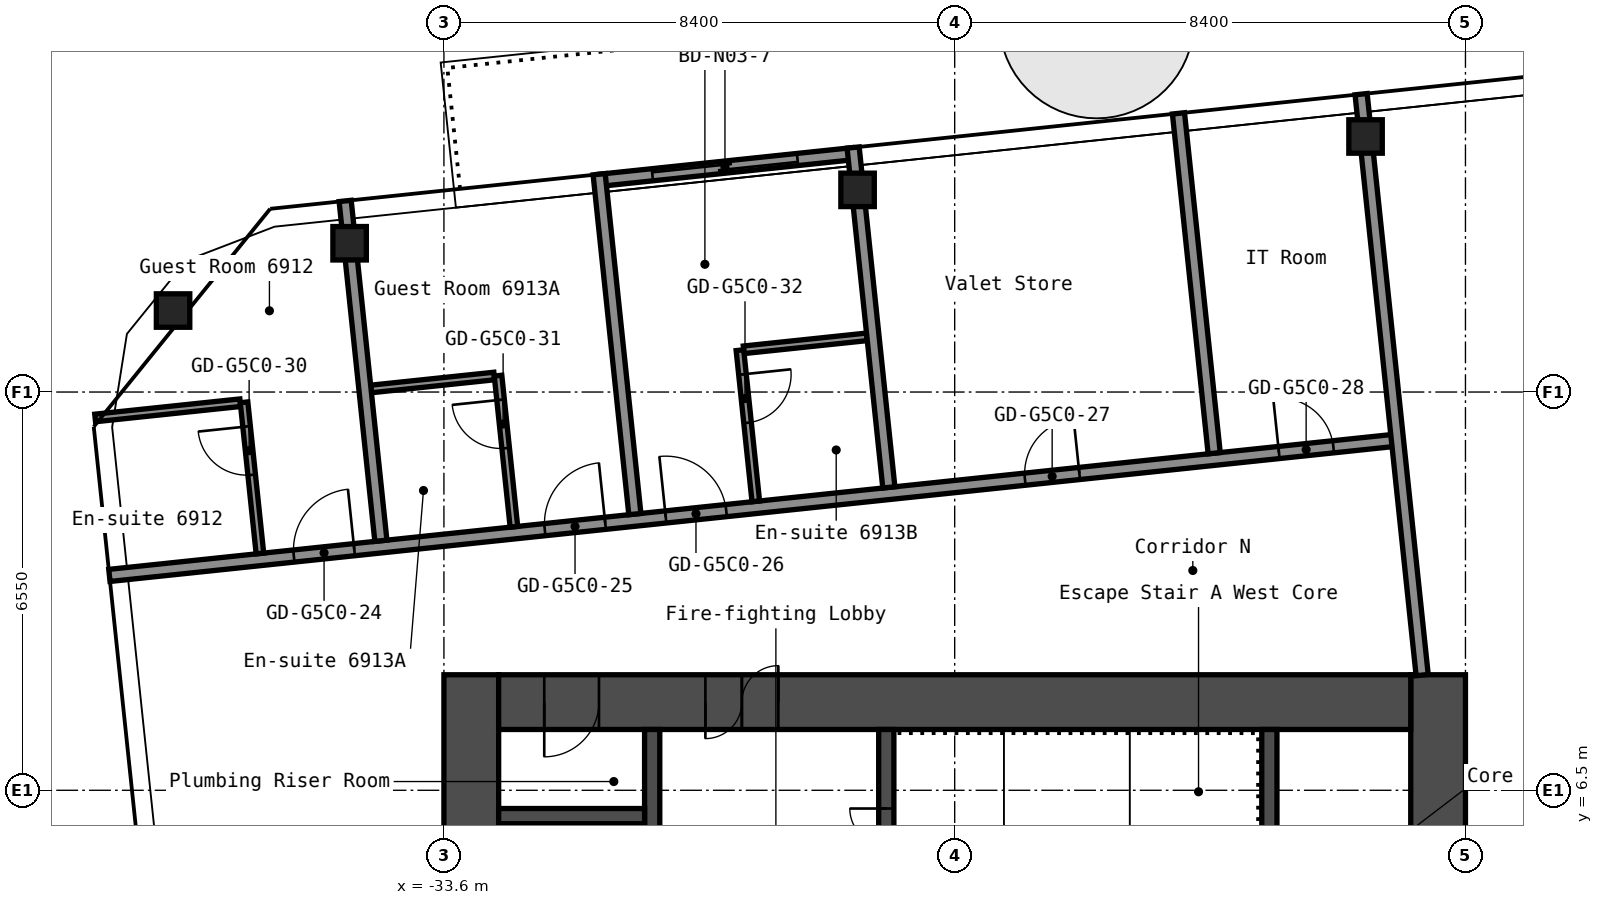
"""IFC4 building model, lengths in metres.
Left out: names, types, materials, properties, quantities, classifications, styles, units other than length and angle.
Written with IfcOpenShell. Run it as: python <this file> out.ifc"""

import sys

from ifc_helpers import new_model, si_unit, direction, frame, frame_2d, origin, origin_2d, place, context, subcontext, project, spatial, rectangle, hollow_rectangle, extrude, element, fill, save


model = new_model("IFC4")
c1 = context("Model", 3, precision=1e-05, world=origin(), true_north=direction((0.0, 1.0)))
c2 = subcontext(c1, "Body", "Model", "MODEL_VIEW")
j1 = project(units=[si_unit("LENGTHUNIT", "METRE"), si_unit("PLANEANGLEUNIT", "RADIAN")], contexts=[c1])
p1 = place(None, origin())
s1 = spatial("IfcSite", under=j1, at=p1, CompositionType="ELEMENT")
p2 = place(p1, origin())
s2 = spatial("IfcBuilding", under=s1, at=p2, CompositionType="ELEMENT")
p3 = place(p2, frame((0.0, 0.0, 245.4)))
s3 = spatial("IfcBuildingStorey", under=s2, at=p3, CompositionType="ELEMENT", Elevation=245.4)
for number, where, z_axis, x_axis in (
    (1, (-38.054, 14.39, 0.0), (0.0, 0.0, 1.0), (1.0, 0.0, 0.0)),
    (2, (-35.151, 15.497, 0.0), (0.0, 0.0, 1.0), (1.0, 0.0, 0.0)),
    (3, (-26.797, 16.375, 0.0), (0.0, 0.0, 1.0), (1.0, 0.0, 0.0)),
    (4, (-18.443, 17.253, 0.0), (0.0, 0.0, 1.0), (1.0, 0.0, 0.0)),
):
    element("IfcColumn", number, at=place(p3, frame(where, z_axis=z_axis, x_axis=x_axis)), inside=s3, PredefinedType="COLUMN", context=c2, shape_type="SweptSolid", body=[
        extrude(hollow_rectangle(XDim=0.55, YDim=0.55, WallThickness=0.022, InnerFilletRadius=0.033, OuterFilletRadius=0.055, at=origin_2d()), origin(), (0.0, 0.0, 1.0), 2.75),
    ])
p4 = place(p3, frame((-17.25, -8.4, 0.0), z_axis=(0.0, 0.0, 1.0), x_axis=(0.0, 1.0, 0.0)))
e5 = element("IfcWall", 5, at=p4, inside=s3, PredefinedType="SHEAR", context=c2, shape_type="SweptSolid", body=[
    extrude(rectangle(XDim=16.8, YDim=0.9, at=frame_2d((8.4, 0.0))), origin(), (0.0, 0.0, 1.0), 2.75),
])
p5 = place(p4, frame((8.321, 0.0, 0.0)))
e6 = element("IfcOpeningElement", 6, at=p5, cuts=e5, PredefinedType="OPENING", context=c2, shape_type="SweptSolid", body=[
    extrude(rectangle(XDim=1.6, YDim=2.1, at=frame_2d((0.8, 1.05))), frame((0.0, 0.46, 0.0), z_axis=(0.0, -1.0, 0.0), x_axis=(1.0, 0.0, 0.0)), (0.0, 0.0, 1.0), 0.92),
])
p6 = place(p3, frame((-33.15, -8.4, 0.0), z_axis=(0.0, 0.0, 1.0), x_axis=(0.0, 1.0, 0.0)))
e7 = element("IfcWall", 7, at=p6, inside=s3, PredefinedType="SHEAR", context=c2, shape_type="SweptSolid", body=[
    extrude(rectangle(XDim=16.8, YDim=0.9, at=frame_2d((8.4, 0.0))), origin(), (0.0, 0.0, 1.0), 2.75),
])
p7 = place(p3, frame((-32.7, 7.95, 0.0), z_axis=(0.0, 0.0, 1.0), x_axis=(1.0, 0.0, 0.0)))
e8 = element("IfcWall", 8, at=p7, inside=s3, PredefinedType="SHEAR", context=c2, shape_type="SweptSolid", body=[
    extrude(rectangle(XDim=15.0, YDim=0.9, at=frame_2d((7.5, 0.0))), origin(), (0.0, 0.0, 1.0), 2.75),
])
p8 = place(p7, frame((3.4, 0.0, 0.0)))
e9 = element("IfcOpeningElement", 9, at=p8, cuts=e8, PredefinedType="OPENING", context=c2, shape_type="SweptSolid", body=[
    extrude(rectangle(XDim=1.2, YDim=2.1, at=frame_2d((0.6, 1.05))), frame((0.0, 0.46, 0.0), z_axis=(0.0, -1.0, 0.0), x_axis=(1.0, 0.0, 0.0)), (0.0, 0.0, 1.0), 0.92),
])
p9 = place(p7, frame((0.75, 0.0, 0.0)))
e10 = element("IfcOpeningElement", 10, at=p9, cuts=e8, PredefinedType="OPENING", context=c2, shape_type="SweptSolid", body=[
    extrude(rectangle(XDim=0.9, YDim=2.1, at=frame_2d((0.45, 1.05))), frame((0.0, 0.46, 0.0), z_axis=(0.0, -1.0, 0.0), x_axis=(1.0, 0.0, 0.0)), (0.0, 0.0, 1.0), 0.92),
])
p10 = place(p3, frame((-20.025, 1.2, 0.0), z_axis=(0.0, 0.0, 1.0), x_axis=(0.0, 1.0, 0.0)))
e11 = element("IfcWall", 11, at=p10, inside=s3, PredefinedType="SHEAR", context=c2, shape_type="SweptSolid", body=[
    extrude(rectangle(XDim=6.3, YDim=0.25, at=frame_2d((3.15, 0.0))), origin(), (0.0, 0.0, 1.0), 2.75),
])
p11 = place(p3, frame((-26.325, 3.75, 0.0), z_axis=(0.0, 0.0, 1.0), x_axis=(0.0, 1.0, 0.0)))
e12 = element("IfcWall", 12, at=p11, inside=s3, PredefinedType="SHEAR", context=c2, shape_type="SweptSolid", body=[
    extrude(rectangle(XDim=3.75, YDim=0.25, at=frame_2d((1.875, 0.0))), origin(), (0.0, 0.0, 1.0), 2.75),
])
p12 = place(p11, frame((1.25, 0.0, 0.0)))
e13 = element("IfcOpeningElement", 13, at=p12, cuts=e12, PredefinedType="OPENING", context=c2, shape_type="SweptSolid", body=[
    extrude(rectangle(XDim=1.2, YDim=2.1, at=frame_2d((0.6, 1.05))), frame((0.0, 0.135, 0.0), z_axis=(0.0, -1.0, 0.0), x_axis=(1.0, 0.0, 0.0)), (0.0, 0.0, 1.0), 0.27),
])
p13 = place(p3, frame((-30.175, 1.45, 0.0), z_axis=(0.0, 0.0, 1.0), x_axis=(0.0, 1.0, 0.0)))
e14 = element("IfcWall", 14, at=p13, inside=s3, PredefinedType="SHEAR", context=c2, shape_type="SweptSolid", body=[
    extrude(rectangle(XDim=6.05, YDim=0.25, at=frame_2d((3.025, 0.0))), origin(), (0.0, 0.0, 1.0), 2.75),
])
p14 = place(p13, frame((2.625, 0.0, 0.0)))
e15 = element("IfcOpeningElement", 15, at=p14, cuts=e14, PredefinedType="OPENING", context=c2, shape_type="SweptSolid", body=[
    extrude(rectangle(XDim=1.1, YDim=2.1, at=frame_2d((0.55, 1.05))), frame((0.0, 0.135, 0.0), z_axis=(0.0, -1.0, 0.0), x_axis=(1.0, 0.0, 0.0)), (0.0, 0.0, 1.0), 0.27),
])
p15 = place(p3, frame((-32.7, 6.075, 0.0), z_axis=(0.0, 0.0, 1.0), x_axis=(1.0, 0.0, 0.0)))
e16 = element("IfcWall", 16, at=p15, inside=s3, PredefinedType="SHEAR", context=c2, shape_type="SweptSolid", body=[
    extrude(rectangle(XDim=2.4, YDim=0.25, at=frame_2d((1.2, 0.0))), origin(), (0.0, 0.0, 1.0), 2.75),
])
p16 = place(p3, frame((-39.102, 10.034, 0.0), z_axis=(0.0, 0.0, 1.0), x_axis=(0.994522585465, 0.104521897229, 0.0)))
e17 = element("IfcWall", 17, at=p16, inside=s3, PredefinedType="PARTITIONING", context=c2, shape_type="SweptSolid", body=[
    extrude(rectangle(XDim=21.3, YDim=0.2, at=frame_2d((10.65, 0.0))), origin(), (0.0, 0.0, 1.0), 2.75),
])
p17 = place(p16, frame((3.05, 0.0, 0.0)))
e18 = element("IfcOpeningElement", 18, at=p17, cuts=e17, PredefinedType="OPENING", context=c2, shape_type="SweptSolid", body=[
    extrude(rectangle(XDim=1.0, YDim=2.1, at=frame_2d((0.5, 1.05))), frame((0.0, 0.11, 0.0), z_axis=(0.0, -1.0, 0.0), x_axis=(1.0, 0.0, 0.0)), (0.0, 0.0, 1.0), 0.22),
])
p18 = place(p16, frame((7.2, 0.0, 0.0)))
e19 = element("IfcOpeningElement", 19, at=p18, cuts=e17, PredefinedType="OPENING", context=c2, shape_type="SweptSolid", body=[
    extrude(rectangle(XDim=1.0, YDim=2.1, at=frame_2d((0.5, 1.05))), frame((0.0, 0.11, 0.0), z_axis=(0.0, -1.0, 0.0), x_axis=(1.0, 0.0, 0.0)), (0.0, 0.0, 1.0), 0.22),
])
p19 = place(p16, frame((9.2, 0.0, 0.0)))
e20 = element("IfcOpeningElement", 20, at=p19, cuts=e17, PredefinedType="OPENING", context=c2, shape_type="SweptSolid", body=[
    extrude(rectangle(XDim=1.0, YDim=2.1, at=frame_2d((0.5, 1.05))), frame((0.0, 0.11, 0.0), z_axis=(0.0, -1.0, 0.0), x_axis=(1.0, 0.0, 0.0)), (0.0, 0.0, 1.0), 0.22),
])
p20 = place(p16, frame((15.14, 0.0, 0.0)))
e21 = element("IfcOpeningElement", 21, at=p20, cuts=e17, PredefinedType="OPENING", context=c2, shape_type="SweptSolid", body=[
    extrude(rectangle(XDim=0.9, YDim=2.1, at=frame_2d((0.45, 1.05))), frame((0.0, 0.11, 0.0), z_axis=(0.0, -1.0, 0.0), x_axis=(1.0, 0.0, 0.0)), (0.0, 0.0, 1.0), 0.22),
])
p21 = place(p16, frame((19.34, 0.0, 0.0)))
e22 = element("IfcOpeningElement", 22, at=p21, cuts=e17, PredefinedType="OPENING", context=c2, shape_type="SweptSolid", body=[
    extrude(rectangle(XDim=0.9, YDim=2.1, at=frame_2d((0.45, 1.05))), frame((0.0, 0.11, 0.0), z_axis=(0.0, -1.0, 0.0), x_axis=(1.0, 0.0, 0.0)), (0.0, 0.0, 1.0), 0.22),
])
p22 = place(p3, frame((-39.336, 12.624, 0.0), z_axis=(0.0, 0.0, 1.0), x_axis=(0.994528281662, 0.104467683877, 0.0)))
e23 = element("IfcWall", 23, at=p22, inside=s3, PredefinedType="PARTITIONING", context=c2, shape_type="SweptSolid", body=[
    extrude(rectangle(XDim=2.4, YDim=0.125, at=frame_2d((1.2, 0.0))), origin(), (0.0, 0.0, 1.0), 2.75),
])
for number, where, z_axis, x_axis in (
    (24, (-34.799, 13.1, 0.0), (0.0, 0.0, 1.0), (0.995, 0.105, 0.0)),
    (25, (-28.67, 13.745, 0.0), (0.0, 0.0, 1.0), (0.995, 0.104, 0.0)),
):
    element("IfcWall", number, at=place(p3, frame(where, z_axis=z_axis, x_axis=x_axis)), inside=s3, PredefinedType="PARTITIONING", context=c2, shape_type="SweptSolid", body=[
        extrude(rectangle(XDim=2.038, YDim=0.125, at=frame_2d((1.019, 0.0))), origin(), (0.0, 0.0, 1.0), 2.75),
    ])
p23 = place(p3, frame((-36.626, 10.395, 0.0), z_axis=(0.0, 0.0, 1.0), x_axis=(-0.104588199498, 0.994515615024, 0.0)))
e26 = element("IfcWall", 26, at=p23, inside=s3, PredefinedType="PARTITIONING", context=c2, shape_type="SweptSolid", body=[
    extrude(rectangle(XDim=2.5, YDim=0.125, at=frame_2d((1.25, 0.0))), origin(), (0.0, 0.0, 1.0), 2.75),
])
p24 = place(p23, frame((1.3, 0.0, 0.0)))
e27 = element("IfcOpeningElement", 27, at=p24, cuts=e26, PredefinedType="OPENING", context=c2, shape_type="SweptSolid", body=[
    extrude(rectangle(XDim=0.8, YDim=2.1, at=frame_2d((0.4, 1.05))), frame((0.0, 0.073, 0.0), z_axis=(0.0, -1.0, 0.0), x_axis=(1.0, 0.0, 0.0)), (0.0, 0.0, 1.0), 0.145),
])
p25 = place(p3, frame((-34.637, 10.604, 0.0), z_axis=(0.0, 0.0, 1.0), x_axis=(-0.104560413987, 0.994518536693, 0.0)))
e28 = element("IfcWall", 28, at=p25, inside=s3, PredefinedType="PARTITIONING", context=c2, shape_type="SweptSolid", body=[
    extrude(rectangle(XDim=5.62, YDim=0.2, at=frame_2d((2.81, 0.0))), origin(), (0.0, 0.0, 1.0), 2.75),
])
p26 = place(p3, frame((-32.449, 10.834, 0.0), z_axis=(0.0, 0.0, 1.0), x_axis=(-0.104501760842, 0.994524701544, 0.0)))
e29 = element("IfcWall", 29, at=p26, inside=s3, PredefinedType="PARTITIONING", context=c2, shape_type="SweptSolid", body=[
    extrude(rectangle(XDim=2.5, YDim=0.125, at=frame_2d((1.25, 0.0))), origin(), (0.0, 0.0, 1.0), 2.75),
])
p27 = place(p26, frame((1.3, 0.0, 0.0)))
e30 = element("IfcOpeningElement", 30, at=p27, cuts=e29, PredefinedType="OPENING", context=c2, shape_type="SweptSolid", body=[
    extrude(rectangle(XDim=0.8, YDim=2.1, at=frame_2d((0.4, 1.05))), frame((0.0, 0.073, 0.0), z_axis=(0.0, -1.0, 0.0), x_axis=(1.0, 0.0, 0.0)), (0.0, 0.0, 1.0), 0.145),
])
p28 = place(p3, frame((-30.46, 11.043, 0.0), z_axis=(0.0, 0.0, 1.0), x_axis=(-0.104560413987, 0.994518536693, 0.0)))
e31 = element("IfcWall", 31, at=p28, inside=s3, PredefinedType="PARTITIONING", context=c2, shape_type="SweptSolid", body=[
    extrude(rectangle(XDim=5.62, YDim=0.2, at=frame_2d((2.81, 0.0))), origin(), (0.0, 0.0, 1.0), 2.75),
])
p29 = place(p3, frame((-28.471, 11.252, 0.0), z_axis=(0.0, 0.0, 1.0), x_axis=(-0.104588199498, 0.994515615024, 0.0)))
e32 = element("IfcWall", 32, at=p29, inside=s3, PredefinedType="PARTITIONING", context=c2, shape_type="SweptSolid", body=[
    extrude(rectangle(XDim=2.5, YDim=0.125, at=frame_2d((1.25, 0.0))), origin(), (0.0, 0.0, 1.0), 2.75),
])
p30 = place(p29, frame((1.3, 0.0, 0.0)))
e33 = element("IfcOpeningElement", 33, at=p30, cuts=e32, PredefinedType="OPENING", context=c2, shape_type="SweptSolid", body=[
    extrude(rectangle(XDim=0.8, YDim=2.1, at=frame_2d((0.4, 1.05))), frame((0.0, 0.073, 0.0), z_axis=(0.0, -1.0, 0.0), x_axis=(1.0, 0.0, 0.0)), (0.0, 0.0, 1.0), 0.145),
])
p31 = place(p3, frame((-26.283, 11.482, 0.0), z_axis=(0.0, 0.0, 1.0), x_axis=(-0.104560413987, 0.994518536693, 0.0)))
e34 = element("IfcWall", 34, at=p31, inside=s3, PredefinedType="PARTITIONING", context=c2, shape_type="SweptSolid", body=[
    extrude(rectangle(XDim=5.62, YDim=0.2, at=frame_2d((2.81, 0.0))), origin(), (0.0, 0.0, 1.0), 2.75),
])
p32 = place(p3, frame((-20.932, 12.044, 0.0), z_axis=(0.0, 0.0, 1.0), x_axis=(-0.104512933269, 0.994523527514, 0.0)))
e35 = element("IfcWall", 35, at=p32, inside=s3, PredefinedType="PARTITIONING", context=c2, shape_type="SweptSolid", body=[
    extrude(rectangle(XDim=5.62, YDim=0.2, at=frame_2d((2.81, 0.0))), origin(), (0.0, 0.0, 1.0), 2.75),
])
p33 = place(p3, frame((-17.512, 8.395, 0.0), z_axis=(0.0, 0.0, 1.0), x_axis=(-0.104524714473, 0.994522289375, 0.0)))
e36 = element("IfcWall", 36, at=p33, inside=s3, PredefinedType="PARTITIONING", context=c2, shape_type="SweptSolid", body=[
    extrude(rectangle(XDim=9.607, YDim=0.2, at=frame_2d((4.803, 0.0))), origin(), (0.0, 0.0, 1.0), 2.75),
])
p34 = place(p3, frame((-26.88, 16.969, 0.0), z_axis=(0.0, 0.0, 1.0), x_axis=(-0.994526987506, -0.104480003457, 0.0)))
p35 = place(p34, frame((0.91, 0.0, 0.0)))
p36 = place(p35, frame((2.4, 0.0, 0.0), z_axis=(0.0, 0.0, 1.0), x_axis=(-1.0, 0.0, 0.0)))
e37 = element("IfcDoor", 37, at=p36, inside=s3, OperationType="SLIDING_TO_LEFT", PredefinedType="DOOR", context=c2, shape_type="SweptSolid", body=[
    extrude(rectangle(XDim=2.4, YDim=2.2, at=frame_2d((1.2, 1.1))), frame((0.0, 0.025, 0.0), z_axis=(0.0, -1.0, 0.0), x_axis=(1.0, 0.0, 0.0)), (0.0, 0.0, 1.0), 0.05),
])
p37 = place(p8, origin())
e38 = element("IfcDoor", 38, at=p37, inside=s3, OperationType="DOUBLE_DOOR_SINGLE_SWING", PredefinedType="DOOR", context=c2, shape_type="SweptSolid", body=[
    extrude(rectangle(XDim=1.2, YDim=2.1, at=frame_2d((0.6, 1.05))), frame((0.0, 0.025, 0.0), z_axis=(0.0, -1.0, 0.0), x_axis=(1.0, 0.0, 0.0)), (0.0, 0.0, 1.0), 0.05),
])
fill(e9, e38)
p38 = place(p9, origin())
e39 = element("IfcDoor", 39, at=p38, inside=s3, OperationType="SINGLE_SWING_LEFT", PredefinedType="DOOR", context=c2, shape_type="SweptSolid", body=[
    extrude(rectangle(XDim=0.9, YDim=2.1, at=frame_2d((0.45, 1.05))), frame((0.0, 0.025, 0.0), z_axis=(0.0, -1.0, 0.0), x_axis=(1.0, 0.0, 0.0)), (0.0, 0.0, 1.0), 0.05),
])
fill(e10, e39)
p39 = place(p12, origin())
e40 = element("IfcDoor", 40, at=p39, inside=s3, OperationType="DOUBLE_DOOR_SINGLE_SWING", PredefinedType="DOOR", context=c2, shape_type="SweptSolid", body=[
    extrude(rectangle(XDim=1.2, YDim=2.1, at=frame_2d((0.6, 1.05))), frame((0.0, 0.025, 0.0), z_axis=(0.0, -1.0, 0.0), x_axis=(1.0, 0.0, 0.0)), (0.0, 0.0, 1.0), 0.05),
])
fill(e13, e40)
p40 = place(p17, origin())
e41 = element("IfcDoor", 41, at=p40, inside=s3, OperationType="SINGLE_SWING_LEFT", PredefinedType="DOOR", context=c2, shape_type="SweptSolid", body=[
    extrude(rectangle(XDim=1.0, YDim=2.1, at=frame_2d((0.5, 1.05))), frame((0.0, 0.025, 0.0), z_axis=(0.0, -1.0, 0.0), x_axis=(1.0, 0.0, 0.0)), (0.0, 0.0, 1.0), 0.05),
])
fill(e18, e41)
p41 = place(p18, origin())
e42 = element("IfcDoor", 42, at=p41, inside=s3, OperationType="SINGLE_SWING_LEFT", PredefinedType="DOOR", context=c2, shape_type="SweptSolid", body=[
    extrude(rectangle(XDim=1.0, YDim=2.1, at=frame_2d((0.5, 1.05))), frame((0.0, 0.025, 0.0), z_axis=(0.0, -1.0, 0.0), x_axis=(1.0, 0.0, 0.0)), (0.0, 0.0, 1.0), 0.05),
])
fill(e19, e42)
p42 = place(p19, origin())
e43 = element("IfcDoor", 43, at=p42, inside=s3, OperationType="SINGLE_SWING_RIGHT", PredefinedType="DOOR", context=c2, shape_type="SweptSolid", body=[
    extrude(rectangle(XDim=1.0, YDim=2.1, at=frame_2d((0.5, 1.05))), frame((0.0, 0.025, 0.0), z_axis=(0.0, -1.0, 0.0), x_axis=(1.0, 0.0, 0.0)), (0.0, 0.0, 1.0), 0.05),
])
fill(e20, e43)
p43 = place(p20, origin())
e44 = element("IfcDoor", 44, at=p43, inside=s3, OperationType="SINGLE_SWING_LEFT", PredefinedType="DOOR", context=c2, shape_type="SweptSolid", body=[
    extrude(rectangle(XDim=0.9, YDim=2.1, at=frame_2d((0.45, 1.05))), frame((0.0, 0.025, 0.0), z_axis=(0.0, -1.0, 0.0), x_axis=(1.0, 0.0, 0.0)), (0.0, 0.0, 1.0), 0.05),
])
fill(e21, e44)
p44 = place(p21, origin())
e45 = element("IfcDoor", 45, at=p44, inside=s3, OperationType="SINGLE_SWING_RIGHT", PredefinedType="DOOR", context=c2, shape_type="SweptSolid", body=[
    extrude(rectangle(XDim=0.9, YDim=2.1, at=frame_2d((0.45, 1.05))), frame((0.0, 0.025, 0.0), z_axis=(0.0, -1.0, 0.0), x_axis=(1.0, 0.0, 0.0)), (0.0, 0.0, 1.0), 0.05),
])
fill(e22, e45)
p45 = place(p24, origin())
e46 = element("IfcDoor", 46, at=p45, inside=s3, OperationType="SINGLE_SWING_LEFT", PredefinedType="DOOR", context=c2, shape_type="SweptSolid", body=[
    extrude(rectangle(XDim=0.8, YDim=2.1, at=frame_2d((0.4, 1.05))), frame((0.0, 0.025, 0.0), z_axis=(0.0, -1.0, 0.0), x_axis=(1.0, 0.0, 0.0)), (0.0, 0.0, 1.0), 0.05),
])
fill(e27, e46)
p46 = place(p27, origin())
e47 = element("IfcDoor", 47, at=p46, inside=s3, OperationType="SINGLE_SWING_LEFT", PredefinedType="DOOR", context=c2, shape_type="SweptSolid", body=[
    extrude(rectangle(XDim=0.8, YDim=2.1, at=frame_2d((0.4, 1.05))), frame((0.0, 0.025, 0.0), z_axis=(0.0, -1.0, 0.0), x_axis=(1.0, 0.0, 0.0)), (0.0, 0.0, 1.0), 0.05),
])
fill(e30, e47)
p47 = place(p30, origin())
e48 = element("IfcDoor", 48, at=p47, inside=s3, OperationType="SINGLE_SWING_RIGHT", PredefinedType="DOOR", context=c2, shape_type="SweptSolid", body=[
    extrude(rectangle(XDim=0.8, YDim=2.1, at=frame_2d((0.4, 1.05))), frame((0.0, 0.025, 0.0), z_axis=(0.0, -1.0, 0.0), x_axis=(1.0, 0.0, 0.0)), (0.0, 0.0, 1.0), 0.05),
])
fill(e33, e48)
save(model, sys.argv[1])
